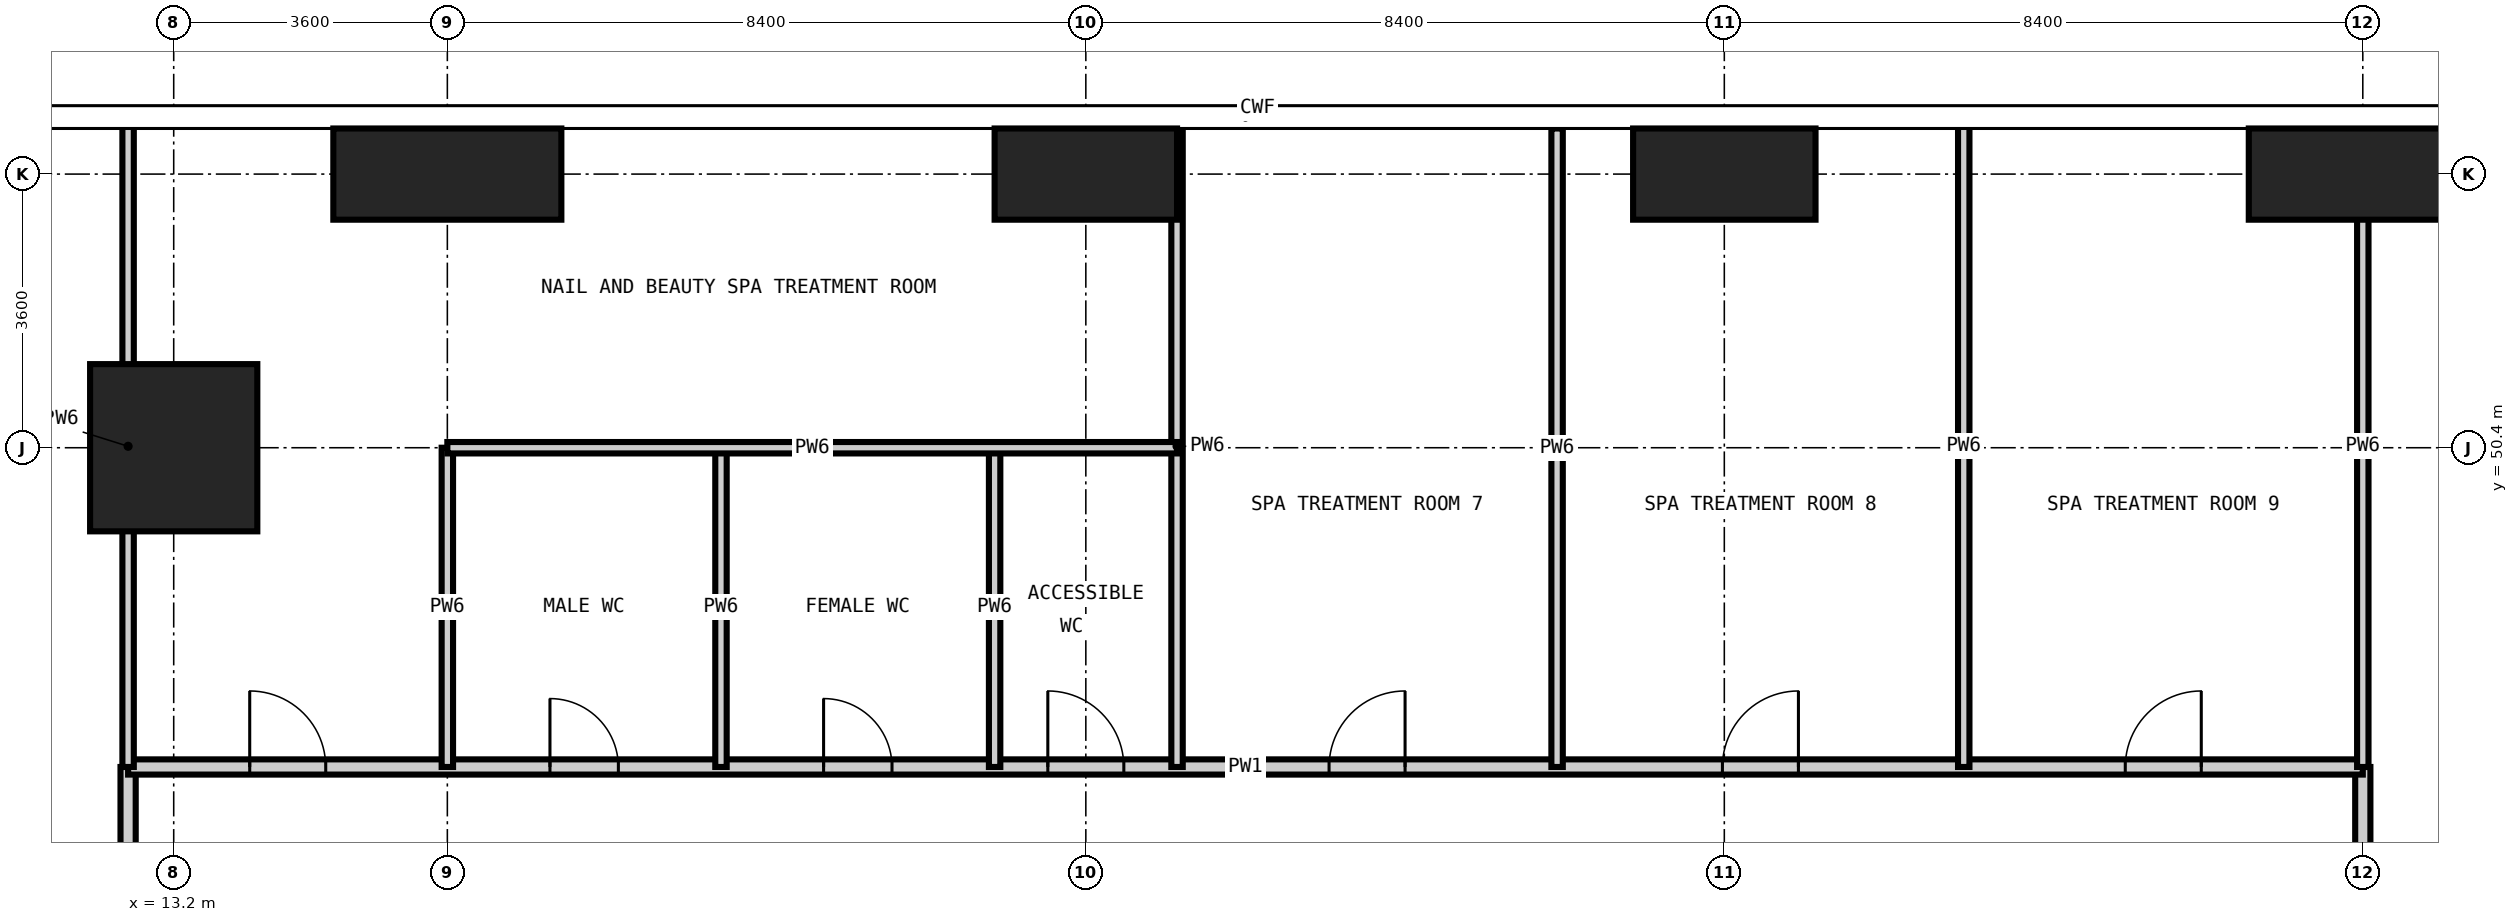
"""IFC4 building model, lengths in metres.
Left out: names, types, materials, properties, quantities, classifications, styles, units other than length and angle.
Written with IfcOpenShell. Run it as: python <this file> out.ifc"""

import sys

from ifc_helpers import new_model, si_unit, direction, frame, frame_2d, origin, origin_2d, place, context, subcontext, project, spatial, rectangle, extrude, element, fill, save


model = new_model("IFC4")
c1 = context("Model", 3, precision=1e-05, world=origin(), true_north=direction((0.0, 1.0)))
c2 = subcontext(c1, "Body", "Model", "MODEL_VIEW")
j1 = project(units=[si_unit("LENGTHUNIT", "METRE"), si_unit("PLANEANGLEUNIT", "RADIAN")], contexts=[c1])
p1 = place(None, origin())
s1 = spatial("IfcSite", under=j1, at=p1, CompositionType="ELEMENT")
p2 = place(p1, origin())
s2 = spatial("IfcBuilding", under=s1, at=p2, CompositionType="ELEMENT")
p3 = place(p2, frame((0.0, 0.0, 147.6)))
s3 = spatial("IfcBuildingStorey", under=s2, at=p3, CompositionType="ELEMENT", Elevation=147.6)
p4 = place(p3, frame((13.2, 50.4, -0.35), z_axis=(0.0, 0.0, 1.0), x_axis=(1.0, 0.0, 0.0)))
e1 = element("IfcColumn", 1, at=p4, inside=s3, PredefinedType="COLUMN", context=c2, shape_type="SweptSolid", body=[
    extrude(rectangle(XDim=2.2, YDim=2.2, at=origin_2d()), origin(), (0.0, 0.0, 1.0), 5.95),
])
p5 = place(p3, frame((16.8, 54.0, -0.35), z_axis=(0.0, 0.0, 1.0), x_axis=(1.0, 0.0, 0.0)))
e2 = element("IfcColumn", 2, at=p5, inside=s3, PredefinedType="COLUMN", context=c2, shape_type="SweptSolid", body=[
    extrude(rectangle(XDim=3.0, YDim=1.2, at=origin_2d()), origin(), (0.0, 0.0, 1.0), 5.95),
])
for number, where, z_axis, x_axis in (
    (3, (25.2, 54.0, -0.35), (0.0, 0.0, 1.0), (1.0, 0.0, 0.0)),
    (4, (33.6, 54.0, -0.35), (0.0, 0.0, 1.0), (1.0, 0.0, 0.0)),
):
    element("IfcColumn", number, at=place(p3, frame(where, z_axis=z_axis, x_axis=x_axis)), inside=s3, PredefinedType="COLUMN", context=c2, shape_type="SweptSolid", body=[
        extrude(rectangle(XDim=2.4, YDim=1.2, at=origin_2d()), origin(), (0.0, 0.0, 1.0), 5.95),
    ])
p6 = place(p3, frame((42.0, 54.0, -0.35), z_axis=(0.0, 0.0, 1.0), x_axis=(1.0, 0.0, 0.0)))
e5 = element("IfcColumn", 5, at=p6, inside=s3, PredefinedType="COLUMN", context=c2, shape_type="SweptSolid", body=[
    extrude(rectangle(XDim=3.0, YDim=1.2, at=origin_2d()), origin(), (0.0, 0.0, 1.0), 5.95),
])
p7 = place(p3, frame((12.6, 33.6, 0.0), z_axis=(0.0, 0.0, 1.0), x_axis=(0.0, 1.0, 0.0)))
e6 = element("IfcWall", 6, at=p7, inside=s3, PredefinedType="PARTITIONING", context=c2, shape_type="SweptSolid", body=[
    extrude(rectangle(XDim=12.6, YDim=0.2, at=frame_2d((6.3, 0.0))), origin(), (0.0, 0.0, 1.0), 5.6),
])
p8 = place(p3, frame((42.0, 42.0, 0.0), z_axis=(0.0, 0.0, 1.0), x_axis=(0.0, 1.0, 0.0)))
e7 = element("IfcWall", 7, at=p8, inside=s3, PredefinedType="PARTITIONING", context=c2, shape_type="SweptSolid", body=[
    extrude(rectangle(XDim=4.2, YDim=0.2, at=frame_2d((2.1, 0.0))), origin(), (0.0, 0.0, 1.0), 5.6),
])
p9 = place(p3, frame((12.6, 46.2, 0.0), z_axis=(0.0, 0.0, 1.0), x_axis=(1.0, 0.0, 0.0)))
e8 = element("IfcWall", 8, at=p9, inside=s3, PredefinedType="PARTITIONING", context=c2, shape_type="SweptSolid", body=[
    extrude(rectangle(XDim=29.4, YDim=0.2, at=frame_2d((14.7, 0.0))), origin(), (0.0, 0.0, 1.0), 5.6),
])
p10 = place(p9, frame((5.55, 0.0, 0.0)))
e9 = element("IfcOpeningElement", 9, at=p10, cuts=e8, PredefinedType="OPENING", context=c2, shape_type="SweptSolid", body=[
    extrude(rectangle(XDim=0.9, YDim=2.1, at=frame_2d((0.45, 1.05))), frame((0.0, 0.11, 0.0), z_axis=(0.0, -1.0, 0.0), x_axis=(1.0, 0.0, 0.0)), (0.0, 0.0, 1.0), 0.22),
])
p11 = place(p9, frame((9.15, 0.0, 0.0)))
e10 = element("IfcOpeningElement", 10, at=p11, cuts=e8, PredefinedType="OPENING", context=c2, shape_type="SweptSolid", body=[
    extrude(rectangle(XDim=0.9, YDim=2.1, at=frame_2d((0.45, 1.05))), frame((0.0, 0.11, 0.0), z_axis=(0.0, -1.0, 0.0), x_axis=(1.0, 0.0, 0.0)), (0.0, 0.0, 1.0), 0.22),
])
p12 = place(p9, frame((12.1, 0.0, 0.0)))
e11 = element("IfcOpeningElement", 11, at=p12, cuts=e8, PredefinedType="OPENING", context=c2, shape_type="SweptSolid", body=[
    extrude(rectangle(XDim=1.0, YDim=2.1, at=frame_2d((0.5, 1.05))), frame((0.0, 0.11, 0.0), z_axis=(0.0, -1.0, 0.0), x_axis=(1.0, 0.0, 0.0)), (0.0, 0.0, 1.0), 0.22),
])
p13 = place(p9, frame((15.8, 0.0, 0.0)))
e12 = element("IfcOpeningElement", 12, at=p13, cuts=e8, PredefinedType="OPENING", context=c2, shape_type="SweptSolid", body=[
    extrude(rectangle(XDim=1.0, YDim=2.1, at=frame_2d((0.5, 1.05))), frame((0.0, 0.11, 0.0), z_axis=(0.0, -1.0, 0.0), x_axis=(1.0, 0.0, 0.0)), (0.0, 0.0, 1.0), 0.22),
])
p14 = place(p9, frame((20.975, 0.0, 0.0)))
e13 = element("IfcOpeningElement", 13, at=p14, cuts=e8, PredefinedType="OPENING", context=c2, shape_type="SweptSolid", body=[
    extrude(rectangle(XDim=1.0, YDim=2.1, at=frame_2d((0.5, 1.05))), frame((0.0, 0.11, 0.0), z_axis=(0.0, -1.0, 0.0), x_axis=(1.0, 0.0, 0.0)), (0.0, 0.0, 1.0), 0.22),
])
p15 = place(p9, frame((26.275, 0.0, 0.0)))
e14 = element("IfcOpeningElement", 14, at=p15, cuts=e8, PredefinedType="OPENING", context=c2, shape_type="SweptSolid", body=[
    extrude(rectangle(XDim=1.0, YDim=2.1, at=frame_2d((0.5, 1.05))), frame((0.0, 0.11, 0.0), z_axis=(0.0, -1.0, 0.0), x_axis=(1.0, 0.0, 0.0)), (0.0, 0.0, 1.0), 0.22),
])
p16 = place(p9, frame((1.6, 0.0, 0.0)))
e15 = element("IfcOpeningElement", 15, at=p16, cuts=e8, PredefinedType="OPENING", context=c2, shape_type="SweptSolid", body=[
    extrude(rectangle(XDim=1.0, YDim=2.1, at=frame_2d((0.5, 1.05))), frame((0.0, 0.11, 0.0), z_axis=(0.0, -1.0, 0.0), x_axis=(1.0, 0.0, 0.0)), (0.0, 0.0, 1.0), 0.22),
])
p17 = place(p3, frame((12.6, 46.2, 0.0), z_axis=(0.0, 0.0, 1.0), x_axis=(0.0, 1.0, 0.0)))
e16 = element("IfcWall", 16, at=p17, inside=s3, PredefinedType="PARTITIONING", context=c2, shape_type="SweptSolid", body=[
    extrude(rectangle(XDim=8.438, YDim=0.15, at=frame_2d((4.219, 0.0))), origin(), (0.0, 0.0, 1.0), 5.6),
])
for number, where, z_axis, x_axis in (
    (17, (16.8, 46.2, 0.0), (0.0, 0.0, 1.0), (0.0, 1.0, 0.0)),
    (18, (20.4, 46.2, 0.0), (0.0, 0.0, 1.0), (0.0, 1.0, 0.0)),
    (19, (24.0, 46.2, 0.0), (0.0, 0.0, 1.0), (0.0, 1.0, 0.0)),
):
    element("IfcWall", number, at=place(p3, frame(where, z_axis=z_axis, x_axis=x_axis)), inside=s3, PredefinedType="PARTITIONING", context=c2, shape_type="SweptSolid", body=[
        extrude(rectangle(XDim=4.2, YDim=0.15, at=frame_2d((2.1, 0.0))), origin(), (0.0, 0.0, 1.0), 5.6),
    ])
p18 = place(p3, frame((26.4, 46.2, 0.0), z_axis=(0.0, 0.0, 1.0), x_axis=(0.0, 1.0, 0.0)))
e20 = element("IfcWall", 20, at=p18, inside=s3, PredefinedType="PARTITIONING", context=c2, shape_type="SweptSolid", body=[
    extrude(rectangle(XDim=8.438, YDim=0.15, at=frame_2d((4.219, 0.0))), origin(), (0.0, 0.0, 1.0), 5.6),
])
p19 = place(p3, frame((31.4, 46.2, 0.0), z_axis=(0.0, 0.0, 1.0), x_axis=(0.0, 1.0, 0.0)))
e21 = element("IfcWall", 21, at=p19, inside=s3, PredefinedType="PARTITIONING", context=c2, shape_type="SweptSolid", body=[
    extrude(rectangle(XDim=8.4, YDim=0.15, at=frame_2d((4.2, 0.0))), origin(), (0.0, 0.0, 1.0), 5.6),
])
for number, where, z_axis, x_axis in (
    (22, (36.75, 46.2, 0.0), (0.0, 0.0, 1.0), (0.0, 1.0, 0.0)),
    (23, (42.0, 46.2, 0.0), (0.0, 0.0, 1.0), (0.0, 1.0, 0.0)),
):
    element("IfcWall", number, at=place(p3, frame(where, z_axis=z_axis, x_axis=x_axis)), inside=s3, PredefinedType="PARTITIONING", context=c2, shape_type="SweptSolid", body=[
        extrude(rectangle(XDim=8.438, YDim=0.15, at=frame_2d((4.219, 0.0))), origin(), (0.0, 0.0, 1.0), 5.6),
    ])
p20 = place(p3, frame((16.8, 50.4, 0.0), z_axis=(0.0, 0.0, 1.0), x_axis=(1.0, 0.0, 0.0)))
e24 = element("IfcWall", 24, at=p20, inside=s3, PredefinedType="PARTITIONING", context=c2, shape_type="SweptSolid", body=[
    extrude(rectangle(XDim=9.6, YDim=0.15, at=frame_2d((4.8, 0.0))), origin(), (0.0, 0.0, 1.0), 5.6),
])
p21 = place(p10, origin())
e25 = element("IfcDoor", 25, at=p21, inside=s3, OperationType="SINGLE_SWING_LEFT", PredefinedType="DOOR", context=c2, shape_type="SweptSolid", body=[
    extrude(rectangle(XDim=0.9, YDim=2.1, at=frame_2d((0.45, 1.05))), frame((0.0, 0.025, 0.0), z_axis=(0.0, -1.0, 0.0), x_axis=(1.0, 0.0, 0.0)), (0.0, 0.0, 1.0), 0.05),
])
fill(e9, e25)
p22 = place(p11, origin())
e26 = element("IfcDoor", 26, at=p22, inside=s3, OperationType="SINGLE_SWING_LEFT", PredefinedType="DOOR", context=c2, shape_type="SweptSolid", body=[
    extrude(rectangle(XDim=0.9, YDim=2.1, at=frame_2d((0.45, 1.05))), frame((0.0, 0.025, 0.0), z_axis=(0.0, -1.0, 0.0), x_axis=(1.0, 0.0, 0.0)), (0.0, 0.0, 1.0), 0.05),
])
fill(e10, e26)
p23 = place(p12, origin())
e27 = element("IfcDoor", 27, at=p23, inside=s3, OperationType="SINGLE_SWING_LEFT", PredefinedType="DOOR", context=c2, shape_type="SweptSolid", body=[
    extrude(rectangle(XDim=1.0, YDim=2.1, at=frame_2d((0.5, 1.05))), frame((0.0, 0.025, 0.0), z_axis=(0.0, -1.0, 0.0), x_axis=(1.0, 0.0, 0.0)), (0.0, 0.0, 1.0), 0.05),
])
fill(e11, e27)
p24 = place(p13, origin())
e28 = element("IfcDoor", 28, at=p24, inside=s3, OperationType="SINGLE_SWING_RIGHT", PredefinedType="DOOR", context=c2, shape_type="SweptSolid", body=[
    extrude(rectangle(XDim=1.0, YDim=2.1, at=frame_2d((0.5, 1.05))), frame((0.0, 0.025, 0.0), z_axis=(0.0, -1.0, 0.0), x_axis=(1.0, 0.0, 0.0)), (0.0, 0.0, 1.0), 0.05),
])
fill(e12, e28)
p25 = place(p14, origin())
e29 = element("IfcDoor", 29, at=p25, inside=s3, OperationType="SINGLE_SWING_RIGHT", PredefinedType="DOOR", context=c2, shape_type="SweptSolid", body=[
    extrude(rectangle(XDim=1.0, YDim=2.1, at=frame_2d((0.5, 1.05))), frame((0.0, 0.025, 0.0), z_axis=(0.0, -1.0, 0.0), x_axis=(1.0, 0.0, 0.0)), (0.0, 0.0, 1.0), 0.05),
])
fill(e13, e29)
p26 = place(p15, origin())
e30 = element("IfcDoor", 30, at=p26, inside=s3, OperationType="SINGLE_SWING_RIGHT", PredefinedType="DOOR", context=c2, shape_type="SweptSolid", body=[
    extrude(rectangle(XDim=1.0, YDim=2.1, at=frame_2d((0.5, 1.05))), frame((0.0, 0.025, 0.0), z_axis=(0.0, -1.0, 0.0), x_axis=(1.0, 0.0, 0.0)), (0.0, 0.0, 1.0), 0.05),
])
fill(e14, e30)
p27 = place(p16, origin())
e31 = element("IfcDoor", 31, at=p27, inside=s3, OperationType="SINGLE_SWING_LEFT", PredefinedType="DOOR", context=c2, shape_type="SweptSolid", body=[
    extrude(rectangle(XDim=1.0, YDim=2.1, at=frame_2d((0.5, 1.05))), frame((0.0, 0.025, 0.0), z_axis=(0.0, -1.0, 0.0), x_axis=(1.0, 0.0, 0.0)), (0.0, 0.0, 1.0), 0.05),
])
fill(e15, e31)
save(model, sys.argv[1])
